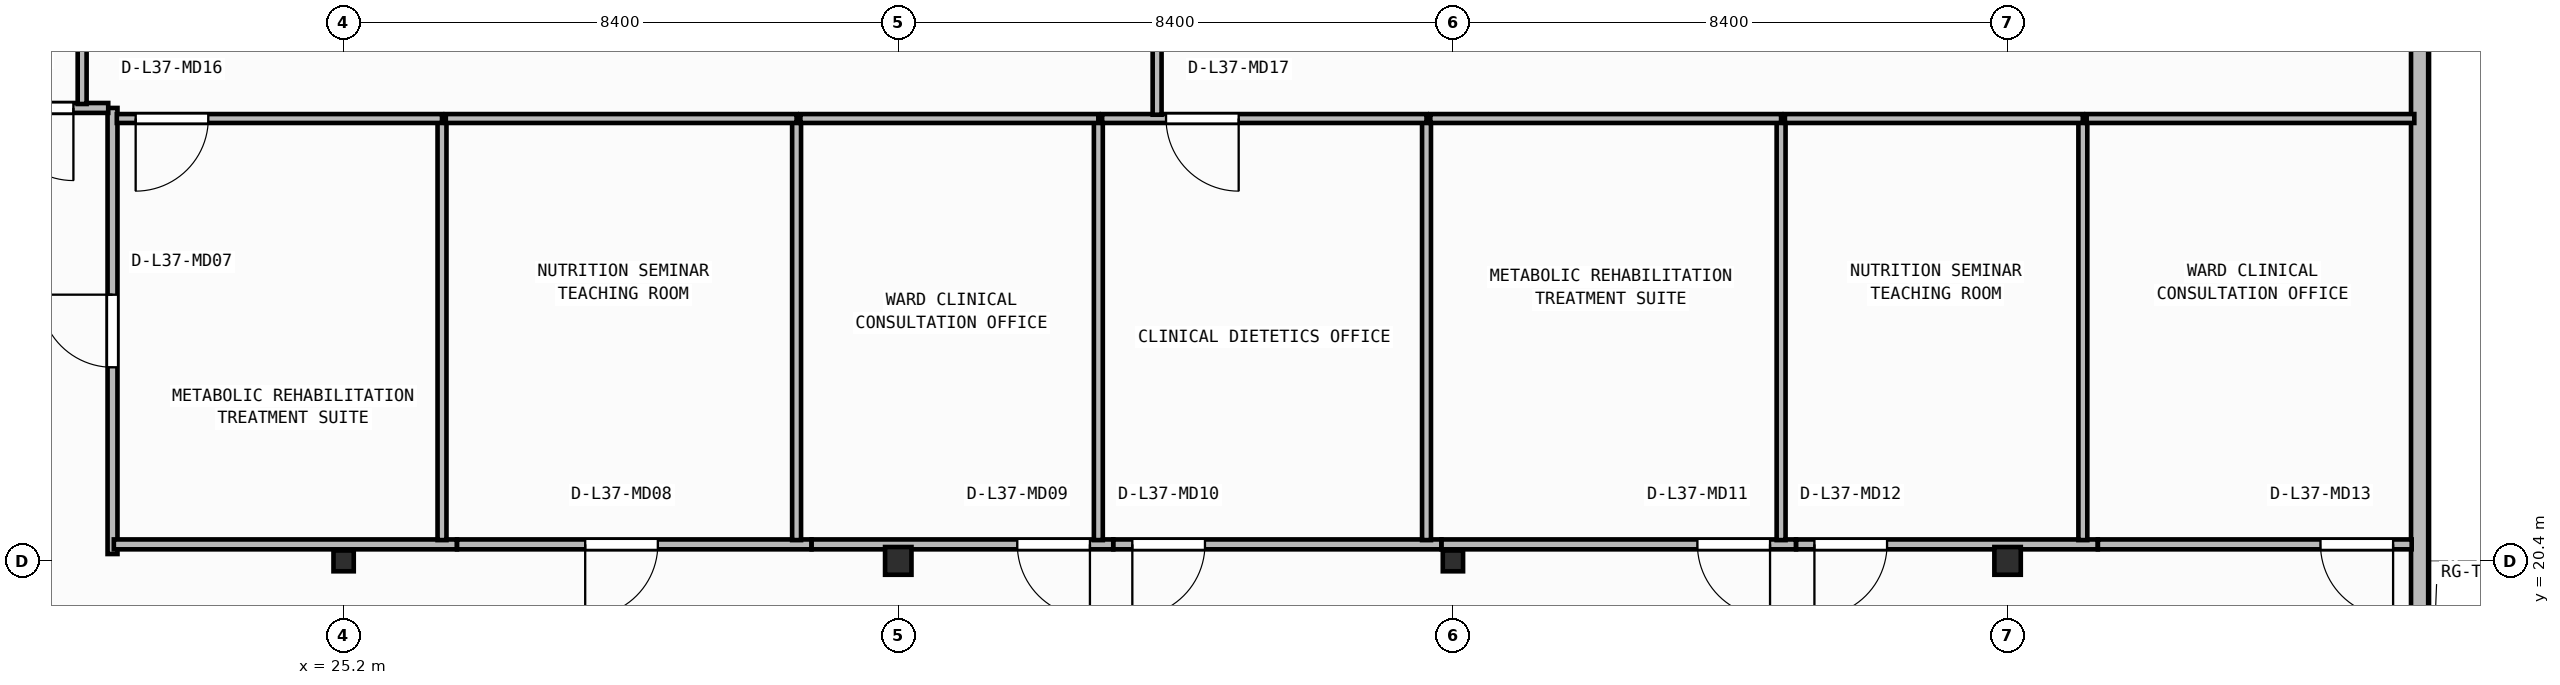
"""IFC4 building model, lengths in metres.
Left out: names, types, materials, properties, quantities, classifications, styles, units other than length and angle.
Written with IfcOpenShell. Run it as: python <this file> out.ifc"""

import sys

from ifc_helpers import new_model, si_unit, direction, frame, frame_2d, origin, origin_2d, place, context, subcontext, project, spatial, rectangle, i_section, extrude, element, fill, save


model = new_model("IFC4")
c1 = context("Model", 3, precision=1e-05, world=origin(), true_north=direction((0.0, 1.0)))
c2 = subcontext(c1, "Body", "Model", "MODEL_VIEW")
j1 = project(units=[si_unit("LENGTHUNIT", "METRE"), si_unit("PLANEANGLEUNIT", "RADIAN")], contexts=[c1])
p1 = place(None, origin())
s1 = spatial("IfcSite", under=j1, at=p1, CompositionType="ELEMENT")
p2 = place(p1, origin())
s2 = spatial("IfcBuilding", under=s1, at=p2, CompositionType="ELEMENT")
p3 = place(p2, frame((0.0, 0.0, 150.75)))
s3 = spatial("IfcBuildingStorey", under=s2, at=p3, CompositionType="ELEMENT", Elevation=150.75)
p4 = place(p3, frame((25.2, 20.4, 0.0), z_axis=(0.0, 0.0, 1.0), x_axis=(1.0, 0.0, 0.0)))
e1 = element("IfcColumn", 1, at=p4, inside=s3, PredefinedType="COLUMN", context=c2, shape_type="SweptSolid", body=[
    extrude(i_section(OverallWidth=0.307, OverallDepth=0.315, WebThickness=0.012, FlangeThickness=0.019, FilletRadius=0.017, at=origin_2d()), origin(), (0.0, 0.0, 1.0), 3.95),
])
p5 = place(p3, frame((33.6, 20.4, 0.0), z_axis=(0.0, 0.0, 1.0), x_axis=(1.0, 0.0, 0.0)))
e2 = element("IfcColumn", 2, at=p5, inside=s3, PredefinedType="COLUMN", context=c2, shape_type="SweptSolid", body=[
    extrude(i_section(OverallWidth=0.4, OverallDepth=0.42, WebThickness=0.025, FlangeThickness=0.04, at=origin_2d()), origin(), (0.0, 0.0, 1.0), 3.95),
])
p6 = place(p3, frame((42.0, 20.4, 0.0), z_axis=(0.0, 0.0, 1.0), x_axis=(1.0, 0.0, 0.0)))
e3 = element("IfcColumn", 3, at=p6, inside=s3, PredefinedType="COLUMN", context=c2, shape_type="SweptSolid", body=[
    extrude(i_section(OverallWidth=0.307, OverallDepth=0.315, WebThickness=0.012, FlangeThickness=0.019, FilletRadius=0.017, at=origin_2d()), origin(), (0.0, 0.0, 1.0), 3.95),
])
p7 = place(p3, frame((50.4, 20.4, 0.0), z_axis=(0.0, 0.0, 1.0), x_axis=(1.0, 0.0, 0.0)))
e4 = element("IfcColumn", 4, at=p7, inside=s3, PredefinedType="COLUMN", context=c2, shape_type="SweptSolid", body=[
    extrude(i_section(OverallWidth=0.4, OverallDepth=0.42, WebThickness=0.025, FlangeThickness=0.04, at=origin_2d()), origin(), (0.0, 0.0, 1.0), 3.95),
])
p8 = place(p3, frame((56.64, 6.86, 0.0), z_axis=(0.0, 0.0, 1.0), x_axis=(0.0, 1.0, 0.0)))
e5 = element("IfcWall", 5, at=p8, inside=s3, PredefinedType="STANDARD", context=c2, shape_type="SweptSolid", body=[
    extrude(rectangle(XDim=23.48, YDim=0.26, at=frame_2d((11.74, 0.0))), origin(), (0.0, 0.0, 1.0), 3.71),
])
p9 = place(p8, frame((9.24, 0.0, 0.0)))
e6 = element("IfcOpeningElement", 6, at=p9, cuts=e5, PredefinedType="OPENING", context=c2, shape_type="SweptSolid", body=[
    extrude(rectangle(XDim=1.3, YDim=2.15, at=frame_2d((0.65, 1.075))), frame((0.0, 0.14, 0.0), z_axis=(0.0, -1.0, 0.0), x_axis=(1.0, 0.0, 0.0)), (0.0, 0.0, 1.0), 0.28),
])
p10 = place(p3, frame((21.7, 20.504, 0.0), z_axis=(0.0, 0.0, 1.0), x_axis=(0.0, 1.0, 0.0)))
e7 = element("IfcWall", 7, at=p10, inside=s3, PredefinedType="PARTITIONING", context=c2, shape_type="SweptSolid", body=[
    extrude(rectangle(XDim=6.756, YDim=0.15, at=frame_2d((3.378, 0.0))), origin(), (0.0, 0.0, 1.0), 3.71),
])
p11 = place(p10, frame((2.828, 0.0, 0.0)))
e8 = element("IfcOpeningElement", 8, at=p11, cuts=e7, PredefinedType="OPENING", context=c2, shape_type="SweptSolid", body=[
    extrude(rectangle(XDim=1.1, YDim=2.1, at=frame_2d((0.55, 1.05))), frame((0.0, 0.085, 0.0), z_axis=(0.0, -1.0, 0.0), x_axis=(1.0, 0.0, 0.0)), (0.0, 0.0, 1.0), 0.17),
])
p12 = place(p3, frame((21.635, 27.26, 0.0), z_axis=(0.0, 0.0, 1.0), x_axis=(-1.0, 0.0, 0.0)))
e9 = element("IfcWall", 9, at=p12, inside=s3, PredefinedType="PARTITIONING", context=c2, shape_type="SweptSolid", body=[
    extrude(rectangle(XDim=2.435, YDim=0.15, at=frame_2d((1.218, 0.0))), origin(), (0.0, 0.0, 1.0), 3.71),
])
p13 = place(p12, frame((0.527, 0.0, 0.0)))
e10 = element("IfcOpeningElement", 10, at=p13, cuts=e9, PredefinedType="OPENING", context=c2, shape_type="SweptSolid", body=[
    extrude(rectangle(XDim=1.1, YDim=2.1, at=frame_2d((0.55, 1.05))), frame((0.0, 0.085, 0.0), z_axis=(0.0, -1.0, 0.0), x_axis=(1.0, 0.0, 0.0)), (0.0, 0.0, 1.0), 0.17),
])
p14 = place(p3, frame((26.916, 20.65, 0.0), z_axis=(0.0, 0.0, 1.0), x_axis=(-1.0, 0.0, 0.0)))
e11 = element("IfcWall", 11, at=p14, inside=s3, PredefinedType="PARTITIONING", context=c2, shape_type="SweptSolid", body=[
    extrude(rectangle(XDim=5.196, YDim=0.15, at=frame_2d((2.598, 0.0))), origin(), (0.0, 0.0, 1.0), 3.083),
])
p15 = place(p3, frame((32.286, 20.65, 0.0), z_axis=(0.0, 0.0, 1.0), x_axis=(-1.0, 0.0, 0.0)))
e12 = element("IfcWall", 12, at=p15, inside=s3, PredefinedType="PARTITIONING", context=c2, shape_type="SweptSolid", body=[
    extrude(rectangle(XDim=5.368, YDim=0.15, at=frame_2d((2.684, 0.0))), origin(), (0.0, 0.0, 1.0), 3.083),
])
p16 = place(p15, frame((2.327, 0.0, 0.0)))
e13 = element("IfcOpeningElement", 13, at=p16, cuts=e12, PredefinedType="OPENING", context=c2, shape_type="SweptSolid", body=[
    extrude(rectangle(XDim=1.1, YDim=2.1, at=frame_2d((0.55, 1.05))), frame((0.0, 0.085, 0.0), z_axis=(0.0, -1.0, 0.0), x_axis=(1.0, 0.0, 0.0)), (0.0, 0.0, 1.0), 0.17),
])
p17 = place(p3, frame((36.856, 20.65, 0.0), z_axis=(0.0, 0.0, 1.0), x_axis=(-1.0, 0.0, 0.0)))
e14 = element("IfcWall", 14, at=p17, inside=s3, PredefinedType="PARTITIONING", context=c2, shape_type="SweptSolid", body=[
    extrude(rectangle(XDim=4.568, YDim=0.15, at=frame_2d((2.284, 0.0))), origin(), (0.0, 0.0, 1.0), 3.083),
])
p18 = place(p17, frame((0.354, 0.0, 0.0)))
e15 = element("IfcOpeningElement", 15, at=p18, cuts=e14, PredefinedType="OPENING", context=c2, shape_type="SweptSolid", body=[
    extrude(rectangle(XDim=1.1, YDim=2.1, at=frame_2d((0.55, 1.05))), frame((0.0, 0.085, 0.0), z_axis=(0.0, -1.0, 0.0), x_axis=(1.0, 0.0, 0.0)), (0.0, 0.0, 1.0), 0.17),
])
p19 = place(p3, frame((41.826, 20.65, 0.0), z_axis=(0.0, 0.0, 1.0), x_axis=(-1.0, 0.0, 0.0)))
e16 = element("IfcWall", 16, at=p19, inside=s3, PredefinedType="PARTITIONING", context=c2, shape_type="SweptSolid", body=[
    extrude(rectangle(XDim=4.968, YDim=0.15, at=frame_2d((2.484, 0.0))), origin(), (0.0, 0.0, 1.0), 3.083),
])
p20 = place(p19, frame((3.581, 0.0, 0.0)))
e17 = element("IfcOpeningElement", 17, at=p20, cuts=e16, PredefinedType="OPENING", context=c2, shape_type="SweptSolid", body=[
    extrude(rectangle(XDim=1.1, YDim=2.1, at=frame_2d((0.55, 1.05))), frame((0.0, 0.085, 0.0), z_axis=(0.0, -1.0, 0.0), x_axis=(1.0, 0.0, 0.0)), (0.0, 0.0, 1.0), 0.17),
])
p21 = place(p3, frame((47.196, 20.65, 0.0), z_axis=(0.0, 0.0, 1.0), x_axis=(-1.0, 0.0, 0.0)))
e18 = element("IfcWall", 18, at=p21, inside=s3, PredefinedType="PARTITIONING", context=c2, shape_type="SweptSolid", body=[
    extrude(rectangle(XDim=5.368, YDim=0.15, at=frame_2d((2.684, 0.0))), origin(), (0.0, 0.0, 1.0), 3.083),
])
p22 = place(p21, frame((0.393, 0.0, 0.0)))
e19 = element("IfcOpeningElement", 19, at=p22, cuts=e18, PredefinedType="OPENING", context=c2, shape_type="SweptSolid", body=[
    extrude(rectangle(XDim=1.1, YDim=2.1, at=frame_2d((0.55, 1.05))), frame((0.0, 0.085, 0.0), z_axis=(0.0, -1.0, 0.0), x_axis=(1.0, 0.0, 0.0)), (0.0, 0.0, 1.0), 0.17),
])
p23 = place(p3, frame((51.766, 20.65, 0.0), z_axis=(0.0, 0.0, 1.0), x_axis=(-1.0, 0.0, 0.0)))
e20 = element("IfcWall", 20, at=p23, inside=s3, PredefinedType="PARTITIONING", context=c2, shape_type="SweptSolid", body=[
    extrude(rectangle(XDim=4.568, YDim=0.15, at=frame_2d((2.284, 0.0))), origin(), (0.0, 0.0, 1.0), 3.083),
])
p24 = place(p23, frame((3.191, 0.0, 0.0)))
e21 = element("IfcOpeningElement", 21, at=p24, cuts=e20, PredefinedType="OPENING", context=c2, shape_type="SweptSolid", body=[
    extrude(rectangle(XDim=1.1, YDim=2.1, at=frame_2d((0.55, 1.05))), frame((0.0, 0.085, 0.0), z_axis=(0.0, -1.0, 0.0), x_axis=(1.0, 0.0, 0.0)), (0.0, 0.0, 1.0), 0.17),
])
p25 = place(p3, frame((56.52, 20.65, 0.0), z_axis=(0.0, 0.0, 1.0), x_axis=(-1.0, 0.0, 0.0)))
e22 = element("IfcWall", 22, at=p25, inside=s3, PredefinedType="PARTITIONING", context=c2, shape_type="SweptSolid", body=[
    extrude(rectangle(XDim=4.752, YDim=0.15, at=frame_2d((2.376, 0.0))), origin(), (0.0, 0.0, 1.0), 3.71),
])
p26 = place(p25, frame((0.281, 0.0, 0.0)))
e23 = element("IfcOpeningElement", 23, at=p26, cuts=e22, PredefinedType="OPENING", context=c2, shape_type="SweptSolid", body=[
    extrude(rectangle(XDim=1.1, YDim=2.1, at=frame_2d((0.55, 1.05))), frame((0.0, 0.085, 0.0), z_axis=(0.0, -1.0, 0.0), x_axis=(1.0, 0.0, 0.0)), (0.0, 0.0, 1.0), 0.17),
])
p27 = place(p3, frame((26.69, 20.715, 0.0), z_axis=(0.0, 0.0, 1.0), x_axis=(0.0, 1.0, 0.0)))
e24 = element("IfcWall", 24, at=p27, inside=s3, PredefinedType="PARTITIONING", context=c2, shape_type="SweptSolid", body=[
    extrude(rectangle(XDim=6.385, YDim=0.135, at=frame_2d((3.192, 0.0))), origin(), (0.0, 0.0, 1.0), 3.71),
])
p28 = place(p3, frame((26.69, 27.1, 0.0), z_axis=(0.0, 0.0, 1.0), x_axis=(-1.0, 0.0, 0.0)))
e25 = element("IfcWall", 25, at=p28, inside=s3, PredefinedType="PARTITIONING", context=c2, shape_type="SweptSolid", body=[
    extrude(rectangle(XDim=4.925, YDim=0.135, at=frame_2d((2.462, 0.0))), origin(), (0.0, 0.0, 1.0), 3.71),
])
p29 = place(p28, frame((3.539, 0.0, 0.0)))
e26 = element("IfcOpeningElement", 26, at=p29, cuts=e25, PredefinedType="OPENING", context=c2, shape_type="SweptSolid", body=[
    extrude(rectangle(XDim=1.1, YDim=2.1, at=frame_2d((0.55, 1.05))), frame((0.0, 0.077, 0.0), z_axis=(0.0, -1.0, 0.0), x_axis=(1.0, 0.0, 0.0)), (0.0, 0.0, 1.0), 0.155),
])
p30 = place(p3, frame((32.06, 20.715, 0.0), z_axis=(0.0, 0.0, 1.0), x_axis=(0.0, 1.0, 0.0)))
e27 = element("IfcWall", 27, at=p30, inside=s3, PredefinedType="PARTITIONING", context=c2, shape_type="SweptSolid", body=[
    extrude(rectangle(XDim=6.385, YDim=0.135, at=frame_2d((3.192, 0.0))), origin(), (0.0, 0.0, 1.0), 3.71),
])
p31 = place(p3, frame((32.06, 27.1, 0.0), z_axis=(0.0, 0.0, 1.0), x_axis=(-1.0, 0.0, 0.0)))
e28 = element("IfcWall", 28, at=p31, inside=s3, PredefinedType="PARTITIONING", context=c2, shape_type="SweptSolid", body=[
    extrude(rectangle(XDim=5.312, YDim=0.135, at=frame_2d((2.656, 0.0))), origin(), (0.0, 0.0, 1.0), 3.71),
])
p32 = place(p3, frame((36.63, 20.715, 0.0), z_axis=(0.0, 0.0, 1.0), x_axis=(0.0, 1.0, 0.0)))
e29 = element("IfcWall", 29, at=p32, inside=s3, PredefinedType="PARTITIONING", context=c2, shape_type="SweptSolid", body=[
    extrude(rectangle(XDim=6.385, YDim=0.135, at=frame_2d((3.192, 0.0))), origin(), (0.0, 0.0, 1.0), 3.71),
])
p33 = place(p3, frame((36.63, 27.1, 0.0), z_axis=(0.0, 0.0, 1.0), x_axis=(-1.0, 0.0, 0.0)))
e30 = element("IfcWall", 30, at=p33, inside=s3, PredefinedType="PARTITIONING", context=c2, shape_type="SweptSolid", body=[
    extrude(rectangle(XDim=4.512, YDim=0.135, at=frame_2d((2.256, 0.0))), origin(), (0.0, 0.0, 1.0), 3.71),
])
p34 = place(p3, frame((41.6, 20.715, 0.0), z_axis=(0.0, 0.0, 1.0), x_axis=(0.0, 1.0, 0.0)))
e31 = element("IfcWall", 31, at=p34, inside=s3, PredefinedType="PARTITIONING", context=c2, shape_type="SweptSolid", body=[
    extrude(rectangle(XDim=6.385, YDim=0.135, at=frame_2d((3.192, 0.0))), origin(), (0.0, 0.0, 1.0), 3.152),
])
p35 = place(p3, frame((41.6, 27.1, 0.0), z_axis=(0.0, 0.0, 1.0), x_axis=(-1.0, 0.0, 0.0)))
e32 = element("IfcWall", 32, at=p35, inside=s3, PredefinedType="PARTITIONING", context=c2, shape_type="SweptSolid", body=[
    extrude(rectangle(XDim=4.913, YDim=0.135, at=frame_2d((2.456, 0.0))), origin(), (0.0, 0.0, 1.0), 3.71),
])
p36 = place(p35, frame((2.845, 0.0, 0.0)))
e33 = element("IfcOpeningElement", 33, at=p36, cuts=e32, PredefinedType="OPENING", context=c2, shape_type="SweptSolid", body=[
    extrude(rectangle(XDim=1.1, YDim=2.1, at=frame_2d((0.55, 1.05))), frame((0.0, 0.077, 0.0), z_axis=(0.0, -1.0, 0.0), x_axis=(1.0, 0.0, 0.0)), (0.0, 0.0, 1.0), 0.155),
])
p37 = place(p3, frame((46.97, 20.715, 0.0), z_axis=(0.0, 0.0, 1.0), x_axis=(0.0, 1.0, 0.0)))
e34 = element("IfcWall", 34, at=p37, inside=s3, PredefinedType="PARTITIONING", context=c2, shape_type="SweptSolid", body=[
    extrude(rectangle(XDim=6.385, YDim=0.135, at=frame_2d((3.192, 0.0))), origin(), (0.0, 0.0, 1.0), 3.71),
])
p38 = place(p3, frame((46.97, 27.1, 0.0), z_axis=(0.0, 0.0, 1.0), x_axis=(-1.0, 0.0, 0.0)))
e35 = element("IfcWall", 35, at=p38, inside=s3, PredefinedType="PARTITIONING", context=c2, shape_type="SweptSolid", body=[
    extrude(rectangle(XDim=5.312, YDim=0.135, at=frame_2d((2.656, 0.0))), origin(), (0.0, 0.0, 1.0), 3.71),
])
p39 = place(p3, frame((51.54, 20.715, 0.0), z_axis=(0.0, 0.0, 1.0), x_axis=(0.0, 1.0, 0.0)))
e36 = element("IfcWall", 36, at=p39, inside=s3, PredefinedType="PARTITIONING", context=c2, shape_type="SweptSolid", body=[
    extrude(rectangle(XDim=6.385, YDim=0.135, at=frame_2d((3.192, 0.0))), origin(), (0.0, 0.0, 1.0), 3.71),
])
p40 = place(p3, frame((51.54, 27.1, 0.0), z_axis=(0.0, 0.0, 1.0), x_axis=(-1.0, 0.0, 0.0)))
e37 = element("IfcWall", 37, at=p40, inside=s3, PredefinedType="PARTITIONING", context=c2, shape_type="SweptSolid", body=[
    extrude(rectangle(XDim=4.512, YDim=0.135, at=frame_2d((2.256, 0.0))), origin(), (0.0, 0.0, 1.0), 3.71),
])
p41 = place(p3, frame((56.56, 27.1, 0.0), z_axis=(0.0, 0.0, 1.0), x_axis=(-1.0, 0.0, 0.0)))
e38 = element("IfcWall", 38, at=p41, inside=s3, PredefinedType="PARTITIONING", context=c2, shape_type="SweptSolid", body=[
    extrude(rectangle(XDim=4.963, YDim=0.135, at=frame_2d((2.481, 0.0))), origin(), (0.0, 0.0, 1.0), 3.71),
])
p42 = place(p3, frame((21.24, 27.32, 0.0), z_axis=(0.0, 0.0, 1.0), x_axis=(0.0, 1.0, 0.0)))
e39 = element("IfcWall", 39, at=p42, inside=s3, PredefinedType="PARTITIONING", context=c2, shape_type="SweptSolid", body=[
    extrude(rectangle(XDim=5.576, YDim=0.135, at=frame_2d((2.788, 0.0))), origin(), (0.0, 0.0, 1.0), 3.71),
])
p43 = place(p3, frame((37.52, 27.157, 0.0), z_axis=(0.0, 0.0, 1.0), x_axis=(0.0, 1.0, 0.0)))
e40 = element("IfcWall", 40, at=p43, inside=s3, PredefinedType="PARTITIONING", context=c2, shape_type="SweptSolid", body=[
    extrude(rectangle(XDim=3.944, YDim=0.135, at=frame_2d((1.972, 0.0))), origin(), (0.0, 0.0, 1.0), 3.71),
])
p44 = place(p11, origin())
e41 = element("IfcDoor", 41, at=p44, inside=s3, OperationType="SINGLE_SWING_RIGHT", PredefinedType="DOOR", context=c2, shape_type="SweptSolid", body=[
    extrude(rectangle(XDim=1.1, YDim=2.1, at=frame_2d((0.55, 1.05))), frame((0.0, 0.025, 0.0), z_axis=(0.0, -1.0, 0.0), x_axis=(1.0, 0.0, 0.0)), (0.0, 0.0, 1.0), 0.05),
])
fill(e8, e41)
p45 = place(p13, origin())
e42 = element("IfcDoor", 42, at=p45, inside=s3, OperationType="SINGLE_SWING_LEFT", PredefinedType="DOOR", context=c2, shape_type="SweptSolid", body=[
    extrude(rectangle(XDim=1.1, YDim=2.1, at=frame_2d((0.55, 1.05))), frame((0.0, 0.025, 0.0), z_axis=(0.0, -1.0, 0.0), x_axis=(1.0, 0.0, 0.0)), (0.0, 0.0, 1.0), 0.05),
])
fill(e10, e42)
p46 = place(p16, origin())
e43 = element("IfcDoor", 43, at=p46, inside=s3, OperationType="SINGLE_SWING_RIGHT", PredefinedType="DOOR", context=c2, shape_type="SweptSolid", body=[
    extrude(rectangle(XDim=1.1, YDim=2.1, at=frame_2d((0.55, 1.05))), frame((0.0, 0.025, 0.0), z_axis=(0.0, -1.0, 0.0), x_axis=(1.0, 0.0, 0.0)), (0.0, 0.0, 1.0), 0.05),
])
fill(e13, e43)
p47 = place(p18, origin())
e44 = element("IfcDoor", 44, at=p47, inside=s3, OperationType="SINGLE_SWING_LEFT", PredefinedType="DOOR", context=c2, shape_type="SweptSolid", body=[
    extrude(rectangle(XDim=1.1, YDim=2.1, at=frame_2d((0.55, 1.05))), frame((0.0, 0.025, 0.0), z_axis=(0.0, -1.0, 0.0), x_axis=(1.0, 0.0, 0.0)), (0.0, 0.0, 1.0), 0.05),
])
fill(e15, e44)
p48 = place(p20, origin())
e45 = element("IfcDoor", 45, at=p48, inside=s3, OperationType="SINGLE_SWING_RIGHT", PredefinedType="DOOR", context=c2, shape_type="SweptSolid", body=[
    extrude(rectangle(XDim=1.1, YDim=2.1, at=frame_2d((0.55, 1.05))), frame((0.0, 0.025, 0.0), z_axis=(0.0, -1.0, 0.0), x_axis=(1.0, 0.0, 0.0)), (0.0, 0.0, 1.0), 0.05),
])
fill(e17, e45)
p49 = place(p22, origin())
e46 = element("IfcDoor", 46, at=p49, inside=s3, OperationType="SINGLE_SWING_LEFT", PredefinedType="DOOR", context=c2, shape_type="SweptSolid", body=[
    extrude(rectangle(XDim=1.1, YDim=2.1, at=frame_2d((0.55, 1.05))), frame((0.0, 0.025, 0.0), z_axis=(0.0, -1.0, 0.0), x_axis=(1.0, 0.0, 0.0)), (0.0, 0.0, 1.0), 0.05),
])
fill(e19, e46)
p50 = place(p24, origin())
e47 = element("IfcDoor", 47, at=p50, inside=s3, OperationType="SINGLE_SWING_RIGHT", PredefinedType="DOOR", context=c2, shape_type="SweptSolid", body=[
    extrude(rectangle(XDim=1.1, YDim=2.1, at=frame_2d((0.55, 1.05))), frame((0.0, 0.025, 0.0), z_axis=(0.0, -1.0, 0.0), x_axis=(1.0, 0.0, 0.0)), (0.0, 0.0, 1.0), 0.05),
])
fill(e21, e47)
p51 = place(p26, origin())
e48 = element("IfcDoor", 48, at=p51, inside=s3, OperationType="SINGLE_SWING_LEFT", PredefinedType="DOOR", context=c2, shape_type="SweptSolid", body=[
    extrude(rectangle(XDim=1.1, YDim=2.1, at=frame_2d((0.55, 1.05))), frame((0.0, 0.025, 0.0), z_axis=(0.0, -1.0, 0.0), x_axis=(1.0, 0.0, 0.0)), (0.0, 0.0, 1.0), 0.05),
])
fill(e23, e48)
p52 = place(p29, origin())
e49 = element("IfcDoor", 49, at=p52, inside=s3, OperationType="SINGLE_SWING_RIGHT", PredefinedType="DOOR", context=c2, shape_type="SweptSolid", body=[
    extrude(rectangle(XDim=1.1, YDim=2.1, at=frame_2d((0.55, 1.05))), frame((0.0, 0.025, 0.0), z_axis=(0.0, -1.0, 0.0), x_axis=(1.0, 0.0, 0.0)), (0.0, 0.0, 1.0), 0.05),
])
fill(e26, e49)
p53 = place(p36, origin())
e50 = element("IfcDoor", 50, at=p53, inside=s3, OperationType="SINGLE_SWING_LEFT", PredefinedType="DOOR", context=c2, shape_type="SweptSolid", body=[
    extrude(rectangle(XDim=1.1, YDim=2.1, at=frame_2d((0.55, 1.05))), frame((0.0, 0.025, 0.0), z_axis=(0.0, -1.0, 0.0), x_axis=(1.0, 0.0, 0.0)), (0.0, 0.0, 1.0), 0.05),
])
fill(e33, e50)
save(model, sys.argv[1])
